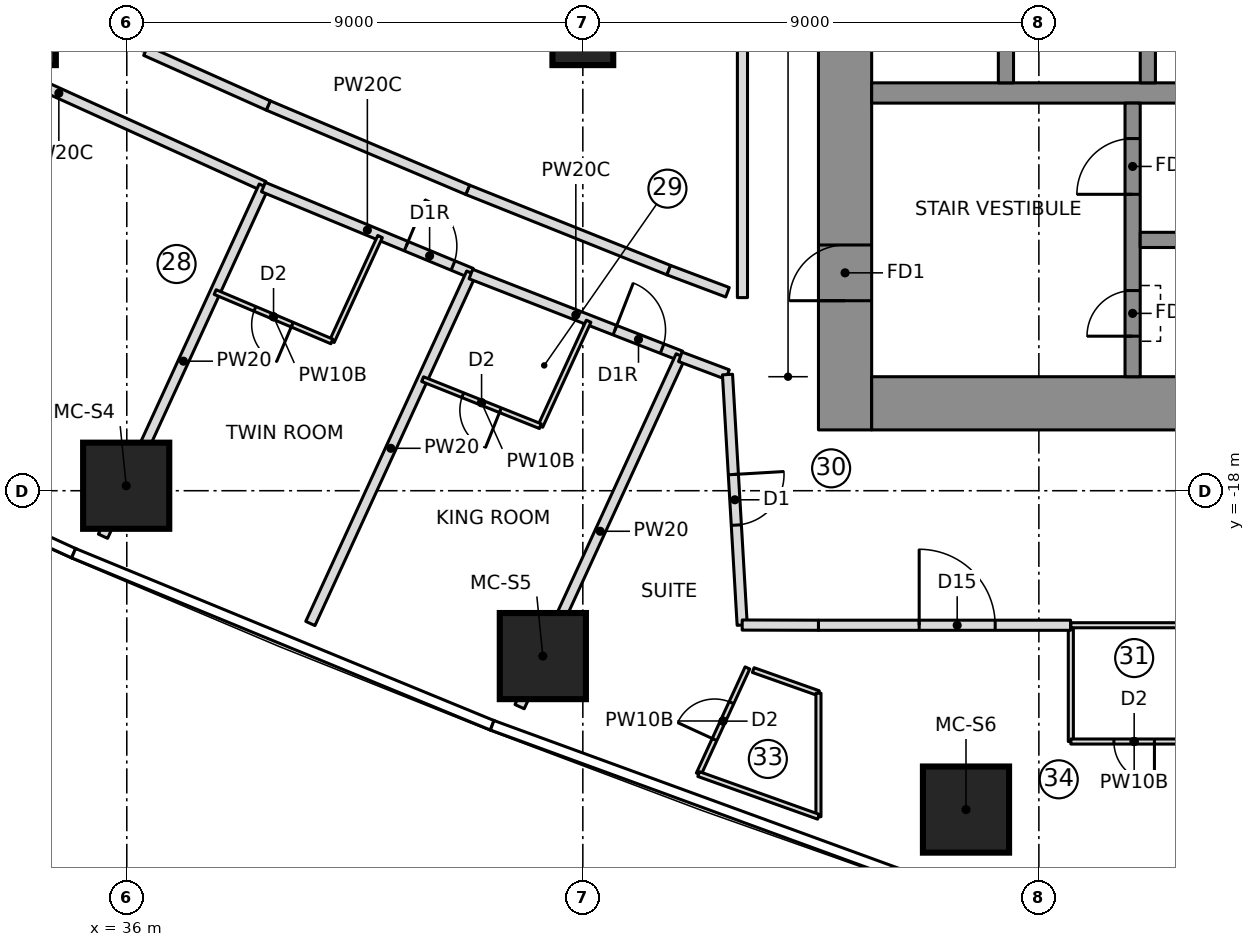
"""IFC4 building model, lengths in metres.
Left out: names, types, materials, properties, quantities, classifications, styles, units other than length and angle.
Written with IfcOpenShell. Run it as: python <this file> out.ifc"""

import sys

from ifc_helpers import new_model, si_unit, direction, frame, frame_2d, origin, origin_2d, place, context, subcontext, project, spatial, rectangle, extrude, element, fill, save


model = new_model("IFC4")
c1 = context("Model", 3, precision=1e-05, world=origin(), true_north=direction((0.0, 1.0)))
c2 = subcontext(c1, "Body", "Model", "MODEL_VIEW")
j1 = project(units=[si_unit("LENGTHUNIT", "METRE"), si_unit("PLANEANGLEUNIT", "RADIAN")], contexts=[c1])
p1 = place(None, origin())
s1 = spatial("IfcSite", under=j1, at=p1, CompositionType="ELEMENT")
p2 = place(p1, origin())
s2 = spatial("IfcBuilding", under=s1, at=p2, CompositionType="ELEMENT")
p3 = place(p2, frame((0.0, 0.0, 113.3)))
s3 = spatial("IfcBuildingStorey", under=s2, at=p3, CompositionType="ELEMENT", Elevation=113.3)
p4 = place(p3, frame((50.175, -16.8, 0.0), z_axis=(0.0, 0.0, 1.0), x_axis=(0.0, 1.0, 0.0)))
e1 = element("IfcWall", 1, at=p4, inside=s3, PredefinedType="SHEAR", context=c2, shape_type="SweptSolid", body=[
    extrude(rectangle(XDim=10.15, YDim=1.05, at=frame_2d((5.075, 0.0))), origin(), (0.0, 0.0, 1.0), 3.55),
])
p5 = place(p4, frame((2.55, 0.0, 0.0)))
e2 = element("IfcOpeningElement", 2, at=p5, cuts=e1, PredefinedType="OPENING", context=c2, shape_type="SweptSolid", body=[
    extrude(rectangle(XDim=1.1, YDim=2.1, at=frame_2d((0.55, 1.05))), frame((0.0, 0.535, 0.0), z_axis=(0.0, -1.0, 0.0), x_axis=(1.0, 0.0, 0.0)), (0.0, 0.0, 1.0), 1.07),
])
p6 = place(p3, frame((50.7, -16.275, 0.0), z_axis=(0.0, 0.0, 1.0), x_axis=(1.0, 0.0, 0.0)))
e3 = element("IfcWall", 3, at=p6, inside=s3, PredefinedType="SHEAR", context=c2, shape_type="SweptSolid", body=[
    extrude(rectangle(XDim=14.07, YDim=1.05, at=frame_2d((7.035, 0.0))), origin(), (0.0, 0.0, 1.0), 3.55),
])
p7 = place(p3, frame((50.7, -10.15, 0.0), z_axis=(0.0, 0.0, 1.0), x_axis=(1.0, 0.0, 0.0)))
e4 = element("IfcWall", 4, at=p7, inside=s3, PredefinedType="SHEAR", context=c2, shape_type="SweptSolid", body=[
    extrude(rectangle(XDim=13.02, YDim=0.4, at=frame_2d((6.51, 0.0))), origin(), (0.0, 0.0, 1.0), 3.55),
])
for number, where, z_axis, x_axis in (
    (5, (53.35, -9.95, 0.0), (0.0, 0.0, 1.0), (0.0, 1.0, 0.0)),
    (6, (56.15, -9.95, 0.0), (0.0, 0.0, 1.0), (0.0, 1.0, 0.0)),
):
    element("IfcWall", number, at=place(p3, frame(where, z_axis=z_axis, x_axis=x_axis)), inside=s3, PredefinedType="SHEAR", context=c2, shape_type="SweptSolid", body=[
        extrude(rectangle(XDim=3.0, YDim=0.3, at=frame_2d((1.5, 0.0))), origin(), (0.0, 0.0, 1.0), 3.55),
    ])
p8 = place(p3, frame((55.85, -15.75, 0.0), z_axis=(0.0, 0.0, 1.0), x_axis=(0.0, 1.0, 0.0)))
e7 = element("IfcWall", 7, at=p8, inside=s3, PredefinedType="SHEAR", context=c2, shape_type="SweptSolid", body=[
    extrude(rectangle(XDim=5.4, YDim=0.3, at=frame_2d((2.7, 0.0))), origin(), (0.0, 0.0, 1.0), 3.55),
])
p9 = place(p8, frame((3.6, 0.0, 0.0)))
e8 = element("IfcOpeningElement", 8, at=p9, cuts=e7, PredefinedType="OPENING", context=c2, shape_type="SweptSolid", body=[
    extrude(rectangle(XDim=1.1, YDim=2.1, at=frame_2d((0.55, 1.05))), frame((0.0, 0.16, 0.0), z_axis=(0.0, -1.0, 0.0), x_axis=(1.0, 0.0, 0.0)), (0.0, 0.0, 1.0), 0.32),
])
p10 = place(p8, frame((0.8, 0.0, 0.0)))
e9 = element("IfcOpeningElement", 9, at=p10, cuts=e7, PredefinedType="OPENING", context=c2, shape_type="SweptSolid", body=[
    extrude(rectangle(XDim=0.9, YDim=2.1, at=frame_2d((0.45, 1.05))), frame((0.0, 0.16, 0.0), z_axis=(0.0, -1.0, 0.0), x_axis=(1.0, 0.0, 0.0)), (0.0, 0.0, 1.0), 0.32),
])
p11 = place(p3, frame((56.0, -13.05, 0.0), z_axis=(0.0, 0.0, 1.0), x_axis=(1.0, 0.0, 0.0)))
e10 = element("IfcWall", 10, at=p11, inside=s3, PredefinedType="SHEAR", context=c2, shape_type="SweptSolid", body=[
    extrude(rectangle(XDim=7.72, YDim=0.3, at=frame_2d((3.86, 0.0))), origin(), (0.0, 0.0, 1.0), 3.55),
])
for number, where, z_axis, x_axis in (
    (11, (35.988, -17.902, 0.0), (0.0, 0.0, 1.0), (1.0, 0.0, 0.0)),
    (12, (44.211, -21.264, 0.0), (0.0, 0.0, 1.0), (1.0, 0.0, 0.0)),
    (13, (52.562, -24.293, 0.0), (0.0, 0.0, 1.0), (1.0, 0.0, 0.0)),
):
    element("IfcColumn", number, at=place(p3, frame(where, z_axis=z_axis, x_axis=x_axis)), inside=s3, PredefinedType="COLUMN", context=c2, shape_type="SweptSolid", body=[
        extrude(rectangle(XDim=1.7, YDim=1.7, at=origin_2d()), origin(), (0.0, 0.0, 1.0), 3.55),
    ])
for number, where, z_axis, x_axis in (
    (14, (34.0, -9.0, 0.0), (0.0, 0.0, 1.0), (1.0, 0.0, 0.0)),
    (15, (45.0, -9.0, 0.0), (0.0, 0.0, 1.0), (1.0, 0.0, 0.0)),
):
    element("IfcColumn", number, at=place(p3, frame(where, z_axis=z_axis, x_axis=x_axis)), inside=s3, PredefinedType="COLUMN", context=c2, shape_type="SweptSolid", body=[
        extrude(rectangle(XDim=1.2, YDim=1.2, at=origin_2d()), origin(), (0.0, 0.0, 1.0), 3.55),
    ])
p12 = place(p3, frame((54.631, -22.95, 0.0), z_axis=(0.0, 0.0, 1.0), x_axis=(0.0, 1.0, 0.0)))
e16 = element("IfcWall", 16, at=p12, inside=s3, PredefinedType="PARTITIONING", context=c2, shape_type="SweptSolid", body=[
    extrude(rectangle(XDim=2.3, YDim=0.1, at=frame_2d((1.15, 0.0))), origin(), (0.0, 0.0, 1.0), 3.25),
])
p13 = place(p3, frame((57.131, -22.95, 0.0), z_axis=(0.0, 0.0, 1.0), x_axis=(-1.0, 0.0, 0.0)))
e17 = element("IfcWall", 17, at=p13, inside=s3, PredefinedType="PARTITIONING", context=c2, shape_type="SweptSolid", body=[
    extrude(rectangle(XDim=2.5, YDim=0.1, at=frame_2d((1.25, 0.0))), origin(), (0.0, 0.0, 1.0), 3.25),
])
p14 = place(p13, frame((0.85, 0.0, 0.0)))
e18 = element("IfcOpeningElement", 18, at=p14, cuts=e17, PredefinedType="OPENING", context=c2, shape_type="SweptSolid", body=[
    extrude(rectangle(XDim=0.8, YDim=2.1, at=frame_2d((0.4, 1.05))), frame((0.0, 0.06, 0.0), z_axis=(0.0, -1.0, 0.0), x_axis=(1.0, 0.0, 0.0)), (0.0, 0.0, 1.0), 0.12),
])
p15 = place(p3, frame((30.614, -8.32, 0.0), z_axis=(0.0, 0.0, 1.0), x_axis=(0.910751030363, -0.41295588226, 0.0)))
e19 = element("IfcWall", 19, at=p15, inside=s3, PredefinedType="PARTITIONING", context=c2, shape_type="SweptSolid", body=[
    extrude(rectangle(XDim=8.883, YDim=0.2, at=frame_2d((4.442, 0.0))), origin(), (0.0, 0.0, 1.0), 3.25),
])
p16 = place(p15, frame((0.45, 0.0, 0.0)))
e20 = element("IfcOpeningElement", 20, at=p16, cuts=e19, PredefinedType="OPENING", context=c2, shape_type="SweptSolid", body=[
    extrude(rectangle(XDim=1.0, YDim=2.1, at=frame_2d((0.5, 1.05))), frame((0.0, 0.11, 0.0), z_axis=(0.0, -1.0, 0.0), x_axis=(1.0, 0.0, 0.0)), (0.0, 0.0, 1.0), 0.22),
])
p17 = place(p3, frame((35.531, -18.898, 0.0), z_axis=(0.0, 0.0, 1.0), x_axis=(0.417416334044, 0.908715359215, 0.0)))
e21 = element("IfcWall", 21, at=p17, inside=s3, PredefinedType="PARTITIONING", context=c2, shape_type="SweptSolid", body=[
    extrude(rectangle(XDim=7.604, YDim=0.2, at=frame_2d((3.802, 0.0))), origin(), (0.0, 0.0, 1.0), 3.25),
])
p18 = place(p3, frame((38.696, -12.007, 0.0), z_axis=(0.0, 0.0, 1.0), x_axis=(0.923970612896, -0.382463470811, 0.0)))
e22 = element("IfcWall", 22, at=p18, inside=s3, PredefinedType="PARTITIONING", context=c2, shape_type="SweptSolid", body=[
    extrude(rectangle(XDim=4.441, YDim=0.2, at=frame_2d((2.22, 0.0))), origin(), (0.0, 0.0, 1.0), 3.25),
])
p19 = place(p18, frame((3.05, 0.0, 0.0)))
e23 = element("IfcOpeningElement", 23, at=p19, cuts=e22, PredefinedType="OPENING", context=c2, shape_type="SweptSolid", body=[
    extrude(rectangle(XDim=1.0, YDim=2.1, at=frame_2d((0.5, 1.05))), frame((0.0, 0.11, 0.0), z_axis=(0.0, -1.0, 0.0), x_axis=(1.0, 0.0, 0.0)), (0.0, 0.0, 1.0), 0.22),
])
p20 = place(p3, frame((40.999, -12.984, 0.0), z_axis=(0.0, 0.0, 1.0), x_axis=(-0.417433204355, -0.908707609686, 0.0)))
e24 = element("IfcWall", 24, at=p20, inside=s3, PredefinedType="PARTITIONING", context=c2, shape_type="SweptSolid", body=[
    extrude(rectangle(XDim=2.278, YDim=0.1, at=frame_2d((1.139, 0.0))), origin(), (0.0, 0.0, 1.0), 3.25),
])
p21 = place(p3, frame((40.048, -15.054, 0.0), z_axis=(0.0, 0.0, 1.0), x_axis=(-0.921042675983, 0.38946166566, 0.0)))
e25 = element("IfcWall", 25, at=p21, inside=s3, PredefinedType="PARTITIONING", context=c2, shape_type="SweptSolid", body=[
    extrude(rectangle(XDim=2.501, YDim=0.1, at=frame_2d((1.25, 0.0))), origin(), (0.0, 0.0, 1.0), 3.25),
])
p22 = place(p21, frame((0.85, 0.0, 0.0)))
e26 = element("IfcOpeningElement", 26, at=p22, cuts=e25, PredefinedType="OPENING", context=c2, shape_type="SweptSolid", body=[
    extrude(rectangle(XDim=0.8, YDim=2.1, at=frame_2d((0.4, 1.05))), frame((0.0, 0.06, 0.0), z_axis=(0.0, -1.0, 0.0), x_axis=(1.0, 0.0, 0.0)), (0.0, 0.0, 1.0), 0.12),
])
p23 = place(p3, frame((39.623, -20.62, 0.0), z_axis=(0.0, 0.0, 1.0), x_axis=(0.417427858403, 0.908710065438, 0.0)))
e27 = element("IfcWall", 27, at=p23, inside=s3, PredefinedType="PARTITIONING", context=c2, shape_type="SweptSolid", body=[
    extrude(rectangle(XDim=7.61, YDim=0.2, at=frame_2d((3.805, 0.0))), origin(), (0.0, 0.0, 1.0), 3.25),
])
p24 = place(p3, frame((42.791, -13.724, 0.0), z_axis=(0.0, 0.0, 1.0), x_axis=(0.931672401616, -0.363299512891, 0.0)))
e28 = element("IfcWall", 28, at=p24, inside=s3, PredefinedType="PARTITIONING", context=c2, shape_type="SweptSolid", body=[
    extrude(rectangle(XDim=4.445, YDim=0.2, at=frame_2d((2.223, 0.0))), origin(), (0.0, 0.0, 1.0), 3.25),
])
p25 = place(p24, frame((3.05, 0.0, 0.0)))
e29 = element("IfcOpeningElement", 29, at=p25, cuts=e28, PredefinedType="OPENING", context=c2, shape_type="SweptSolid", body=[
    extrude(rectangle(XDim=1.0, YDim=2.1, at=frame_2d((0.5, 1.05))), frame((0.0, 0.11, 0.0), z_axis=(0.0, -1.0, 0.0), x_axis=(1.0, 0.0, 0.0)), (0.0, 0.0, 1.0), 0.22),
])
p26 = place(p3, frame((45.114, -14.655, 0.0), z_axis=(0.0, 0.0, 1.0), x_axis=(-0.417373525971, -0.908735021785, 0.0)))
e30 = element("IfcWall", 30, at=p26, inside=s3, PredefinedType="PARTITIONING", context=c2, shape_type="SweptSolid", body=[
    extrude(rectangle(XDim=2.28, YDim=0.1, at=frame_2d((1.14, 0.0))), origin(), (0.0, 0.0, 1.0), 3.25),
])
p27 = place(p3, frame((44.163, -16.727, 0.0), z_axis=(0.0, 0.0, 1.0), x_axis=(-0.928638024739, 0.370987087388, 0.0)))
e31 = element("IfcWall", 31, at=p27, inside=s3, PredefinedType="PARTITIONING", context=c2, shape_type="SweptSolid", body=[
    extrude(rectangle(XDim=2.503, YDim=0.1, at=frame_2d((1.252, 0.0))), origin(), (0.0, 0.0, 1.0), 3.25),
])
p28 = place(p27, frame((0.85, 0.0, 0.0)))
e32 = element("IfcOpeningElement", 32, at=p28, cuts=e31, PredefinedType="OPENING", context=c2, shape_type="SweptSolid", body=[
    extrude(rectangle(XDim=0.8, YDim=2.1, at=frame_2d((0.4, 1.05))), frame((0.0, 0.06, 0.0), z_axis=(0.0, -1.0, 0.0), x_axis=(1.0, 0.0, 0.0)), (0.0, 0.0, 1.0), 0.12),
])
p29 = place(p3, frame((43.752, -22.262, 0.0), z_axis=(0.0, 0.0, 1.0), x_axis=(0.417437957167, 0.908705426371, 0.0)))
e33 = element("IfcWall", 33, at=p29, inside=s3, PredefinedType="PARTITIONING", context=c2, shape_type="SweptSolid", body=[
    extrude(rectangle(XDim=7.619, YDim=0.2, at=frame_2d((3.81, 0.0))), origin(), (0.0, 0.0, 1.0), 3.25),
])
p30 = place(p3, frame((48.363, -21.54, 0.0), z_axis=(0.0, 0.0, 1.0), x_axis=(0.942692856107, -0.333661773425, 0.0)))
e34 = element("IfcWall", 34, at=p30, inside=s3, PredefinedType="PARTITIONING", context=c2, shape_type="SweptSolid", body=[
    extrude(rectangle(XDim=1.365, YDim=0.1, at=frame_2d((0.683, 0.0))), origin(), (0.0, 0.0, 1.0), 3.25),
])
p31 = place(p3, frame((47.286, -23.592, 0.0), z_axis=(0.0, 0.0, 1.0), x_axis=(0.41749308293, 0.908680100864, 0.0)))
e35 = element("IfcWall", 35, at=p31, inside=s3, PredefinedType="PARTITIONING", context=c2, shape_type="SweptSolid", body=[
    extrude(rectangle(XDim=2.306, YDim=0.1, at=frame_2d((1.153, 0.0))), origin(), (0.0, 0.0, 1.0), 3.25),
])
p32 = place(p31, frame((0.75, 0.0, 0.0)))
e36 = element("IfcOpeningElement", 36, at=p32, cuts=e35, PredefinedType="OPENING", context=c2, shape_type="SweptSolid", body=[
    extrude(rectangle(XDim=0.8, YDim=2.1, at=frame_2d((0.4, 1.05))), frame((0.0, 0.06, 0.0), z_axis=(0.0, -1.0, 0.0), x_axis=(1.0, 0.0, 0.0)), (0.0, 0.0, 1.0), 0.12),
])
p33 = place(p3, frame((46.696, -13.647, 0.0), z_axis=(0.0, 0.0, 1.0), x_axis=(-0.928638161177, 0.370986745864, 0.0)))
e37 = element("IfcWall", 37, at=p33, inside=s3, PredefinedType="PARTITIONING", context=c2, shape_type="SweptSolid", body=[
    extrude(rectangle(XDim=4.273, YDim=0.2, at=frame_2d((2.136, 0.0))), origin(), (0.0, 0.0, 1.0), 3.25),
])
p34 = place(p3, frame((42.728, -12.062, 0.0), z_axis=(0.0, 0.0, 1.0), x_axis=(-0.921037415532, 0.389474105929, 0.0)))
e38 = element("IfcWall", 38, at=p34, inside=s3, PredefinedType="PARTITIONING", context=c2, shape_type="SweptSolid", body=[
    extrude(rectangle(XDim=4.273, YDim=0.2, at=frame_2d((2.137, 0.0))), origin(), (0.0, 0.0, 1.0), 3.25),
])
p35 = place(p3, frame((38.792, -10.397, 0.0), z_axis=(0.0, 0.0, 1.0), x_axis=(-0.913030623494, 0.407891015544, 0.0)))
e39 = element("IfcWall", 39, at=p35, inside=s3, PredefinedType="PARTITIONING", context=c2, shape_type="SweptSolid", body=[
    extrude(rectangle(XDim=2.648, YDim=0.2, at=frame_2d((1.324, 0.0))), origin(), (0.0, 0.0, 1.0), 3.25),
])
p36 = place(p3, frame((49.65, -20.655, 0.0), z_axis=(0.0, 0.0, 1.0), x_axis=(1.0, 0.0, 0.0)))
e40 = element("IfcWall", 40, at=p36, inside=s3, PredefinedType="PARTITIONING", context=c2, shape_type="SweptSolid", body=[
    extrude(rectangle(XDim=4.976, YDim=0.2, at=frame_2d((2.488, 0.0))), origin(), (0.0, 0.0, 1.0), 3.25),
])
p37 = place(p36, frame((1.988, 0.0, 0.0)))
e41 = element("IfcOpeningElement", 41, at=p37, cuts=e40, PredefinedType="OPENING", context=c2, shape_type="SweptSolid", body=[
    extrude(rectangle(XDim=1.5, YDim=2.1, at=frame_2d((0.75, 1.05))), frame((0.0, 0.11, 0.0), z_axis=(0.0, -1.0, 0.0), x_axis=(1.0, 0.0, 0.0)), (0.0, 0.0, 1.0), 0.22),
])
p38 = place(p3, frame((54.631, -20.655, 0.0), z_axis=(0.0, 0.0, 1.0), x_axis=(1.0, 0.0, 0.0)))
e42 = element("IfcWall", 42, at=p38, inside=s3, PredefinedType="PARTITIONING", context=c2, shape_type="SweptSolid", body=[
    extrude(rectangle(XDim=2.5, YDim=0.1, at=frame_2d((1.25, 0.0))), origin(), (0.0, 0.0, 1.0), 3.25),
])
p39 = place(p3, frame((49.65, -21.996, 0.0), z_axis=(0.0, 0.0, 1.0), x_axis=(0.0, -1.0, 0.0)))
e43 = element("IfcWall", 43, at=p39, inside=s3, PredefinedType="PARTITIONING", context=c2, shape_type="SweptSolid", body=[
    extrude(rectangle(XDim=2.439, YDim=0.1, at=frame_2d((1.22, 0.0))), origin(), (0.0, 0.0, 1.0), 3.25),
])
p40 = place(p3, frame((49.65, -24.435, 0.0), z_axis=(0.0, 0.0, 1.0), x_axis=(-0.941933231826, 0.335800218555, 0.0)))
e44 = element("IfcWall", 44, at=p40, inside=s3, PredefinedType="PARTITIONING", context=c2, shape_type="SweptSolid", body=[
    extrude(rectangle(XDim=2.51, YDim=0.1, at=frame_2d((1.255, 0.0))), origin(), (0.0, 0.0, 1.0), 3.25),
])
p41 = place(p3, frame((46.924, -15.357, 0.0), z_axis=(0.0, 0.0, 1.0), x_axis=(0.935803526171, -0.35252199989, 0.0)))
e45 = element("IfcWall", 45, at=p41, inside=s3, PredefinedType="PARTITIONING", context=c2, shape_type="SweptSolid", body=[
    extrude(rectangle(XDim=0.995, YDim=0.2, at=frame_2d((0.497, 0.0))), origin(), (0.0, 0.0, 1.0), 3.25),
])
p42 = place(p3, frame((47.855, -14.083, 0.0), z_axis=(0.0, 0.0, 1.0), x_axis=(-0.935907269358, 0.352246480696, 0.0)))
e46 = element("IfcWall", 46, at=p42, inside=s3, PredefinedType="PARTITIONING", context=c2, shape_type="SweptSolid", body=[
    extrude(rectangle(XDim=1.239, YDim=0.2, at=frame_2d((0.619, 0.0))), origin(), (0.0, 0.0, 1.0), 3.25),
])
p43 = place(p3, frame((47.855, -15.707, 0.0), z_axis=(0.0, 0.0, 1.0), x_axis=(0.058568850083, -0.998283371493, 0.0)))
e47 = element("IfcWall", 47, at=p43, inside=s3, PredefinedType="PARTITIONING", context=c2, shape_type="SweptSolid", body=[
    extrude(rectangle(XDim=4.952, YDim=0.2, at=frame_2d((2.476, 0.0))), origin(), (0.0, 0.0, 1.0), 3.25),
])
p44 = place(p43, frame((1.976, 0.0, 0.0)))
e48 = element("IfcOpeningElement", 48, at=p44, cuts=e47, PredefinedType="OPENING", context=c2, shape_type="SweptSolid", body=[
    extrude(rectangle(XDim=1.0, YDim=2.1, at=frame_2d((0.5, 1.05))), frame((0.0, 0.11, 0.0), z_axis=(0.0, -1.0, 0.0), x_axis=(1.0, 0.0, 0.0)), (0.0, 0.0, 1.0), 0.22),
])
p45 = place(p3, frame((48.15, 14.189, 0.0), z_axis=(0.0, 0.0, 1.0), x_axis=(0.0, -1.0, 0.0)))
e49 = element("IfcWall", 49, at=p45, inside=s3, PredefinedType="PARTITIONING", context=c2, shape_type="SweptSolid", body=[
    extrude(rectangle(XDim=28.377, YDim=0.2, at=frame_2d((14.189, 0.0))), origin(), (0.0, 0.0, 1.0), 3.25),
])
p46 = place(p3, frame((48.145, -20.651, 0.0), z_axis=(0.0, 0.0, 1.0), x_axis=(0.999996196879, -0.002757938895, 0.0)))
e50 = element("IfcWall", 50, at=p46, inside=s3, PredefinedType="PARTITIONING", context=c2, shape_type="SweptSolid", body=[
    extrude(rectangle(XDim=1.505, YDim=0.2, at=frame_2d((0.752, 0.0))), origin(), (0.0, 0.0, 1.0), 3.25),
])
p47 = place(p14, origin())
e51 = element("IfcDoor", 51, at=p47, inside=s3, OperationType="SINGLE_SWING_LEFT", PredefinedType="DOOR", context=c2, shape_type="SweptSolid", body=[
    extrude(rectangle(XDim=0.8, YDim=2.1, at=frame_2d((0.4, 1.05))), frame((0.0, 0.025, 0.0), z_axis=(0.0, -1.0, 0.0), x_axis=(1.0, 0.0, 0.0)), (0.0, 0.0, 1.0), 0.05),
])
fill(e18, e51)
p48 = place(p22, origin())
e52 = element("IfcDoor", 52, at=p48, inside=s3, OperationType="SINGLE_SWING_LEFT", PredefinedType="DOOR", context=c2, shape_type="SweptSolid", body=[
    extrude(rectangle(XDim=0.8, YDim=2.1, at=frame_2d((0.4, 1.05))), frame((0.0, 0.025, 0.0), z_axis=(0.0, -1.0, 0.0), x_axis=(1.0, 0.0, 0.0)), (0.0, 0.0, 1.0), 0.05),
])
fill(e26, e52)
p49 = place(p19, origin())
e53 = element("IfcDoor", 53, at=p49, inside=s3, OperationType="SINGLE_SWING_RIGHT", PredefinedType="DOOR", context=c2, shape_type="SweptSolid", body=[
    extrude(rectangle(XDim=1.0, YDim=2.1, at=frame_2d((0.5, 1.05))), frame((0.0, 0.025, 0.0), z_axis=(0.0, -1.0, 0.0), x_axis=(1.0, 0.0, 0.0)), (0.0, 0.0, 1.0), 0.05),
])
fill(e23, e53)
p50 = place(p28, origin())
e54 = element("IfcDoor", 54, at=p50, inside=s3, OperationType="SINGLE_SWING_LEFT", PredefinedType="DOOR", context=c2, shape_type="SweptSolid", body=[
    extrude(rectangle(XDim=0.8, YDim=2.1, at=frame_2d((0.4, 1.05))), frame((0.0, 0.025, 0.0), z_axis=(0.0, -1.0, 0.0), x_axis=(1.0, 0.0, 0.0)), (0.0, 0.0, 1.0), 0.05),
])
fill(e32, e54)
p51 = place(p25, origin())
e55 = element("IfcDoor", 55, at=p51, inside=s3, OperationType="SINGLE_SWING_RIGHT", PredefinedType="DOOR", context=c2, shape_type="SweptSolid", body=[
    extrude(rectangle(XDim=1.0, YDim=2.1, at=frame_2d((0.5, 1.05))), frame((0.0, 0.025, 0.0), z_axis=(0.0, -1.0, 0.0), x_axis=(1.0, 0.0, 0.0)), (0.0, 0.0, 1.0), 0.05),
])
fill(e29, e55)
p52 = place(p32, origin())
e56 = element("IfcDoor", 56, at=p52, inside=s3, OperationType="SINGLE_SWING_LEFT", PredefinedType="DOOR", context=c2, shape_type="SweptSolid", body=[
    extrude(rectangle(XDim=0.8, YDim=2.1, at=frame_2d((0.4, 1.05))), frame((0.0, 0.025, 0.0), z_axis=(0.0, -1.0, 0.0), x_axis=(1.0, 0.0, 0.0)), (0.0, 0.0, 1.0), 0.05),
])
fill(e36, e56)
p53 = place(p37, origin())
e57 = element("IfcDoor", 57, at=p53, inside=s3, OperationType="DOUBLE_DOOR_SINGLE_SWING", PredefinedType="DOOR", context=c2, shape_type="SweptSolid", body=[
    extrude(rectangle(XDim=1.5, YDim=2.1, at=frame_2d((0.75, 1.05))), frame((0.0, 0.025, 0.0), z_axis=(0.0, -1.0, 0.0), x_axis=(1.0, 0.0, 0.0)), (0.0, 0.0, 1.0), 0.05),
])
fill(e41, e57)
p54 = place(p44, origin())
e58 = element("IfcDoor", 58, at=p54, inside=s3, OperationType="SINGLE_SWING_LEFT", PredefinedType="DOOR", context=c2, shape_type="SweptSolid", body=[
    extrude(rectangle(XDim=1.0, YDim=2.1, at=frame_2d((0.5, 1.05))), frame((0.0, 0.025, 0.0), z_axis=(0.0, -1.0, 0.0), x_axis=(1.0, 0.0, 0.0)), (0.0, 0.0, 1.0), 0.05),
])
fill(e48, e58)
p55 = place(p9, origin())
e59 = element("IfcDoor", 59, at=p55, inside=s3, OperationType="SINGLE_SWING_RIGHT", PredefinedType="DOOR", context=c2, shape_type="SweptSolid", body=[
    extrude(rectangle(XDim=1.1, YDim=2.1, at=frame_2d((0.55, 1.05))), frame((0.0, 0.025, 0.0), z_axis=(0.0, -1.0, 0.0), x_axis=(1.0, 0.0, 0.0)), (0.0, 0.0, 1.0), 0.05),
])
fill(e8, e59)
p56 = place(p5, origin())
e60 = element("IfcDoor", 60, at=p56, inside=s3, OperationType="SINGLE_SWING_RIGHT", PredefinedType="DOOR", context=c2, shape_type="SweptSolid", body=[
    extrude(rectangle(XDim=1.1, YDim=2.1, at=frame_2d((0.55, 1.05))), frame((0.0, 0.025, 0.0), z_axis=(0.0, -1.0, 0.0), x_axis=(1.0, 0.0, 0.0)), (0.0, 0.0, 1.0), 0.05),
])
fill(e2, e60)
p57 = place(p10, origin())
e61 = element("IfcDoor", 61, at=p57, inside=s3, OperationType="SINGLE_SWING_LEFT", PredefinedType="DOOR", context=c2, shape_type="SweptSolid", body=[
    extrude(rectangle(XDim=0.9, YDim=2.1, at=frame_2d((0.45, 1.05))), frame((0.0, 0.025, 0.0), z_axis=(0.0, -1.0, 0.0), x_axis=(1.0, 0.0, 0.0)), (0.0, 0.0, 1.0), 0.05),
])
fill(e9, e61)
save(model, sys.argv[1])
